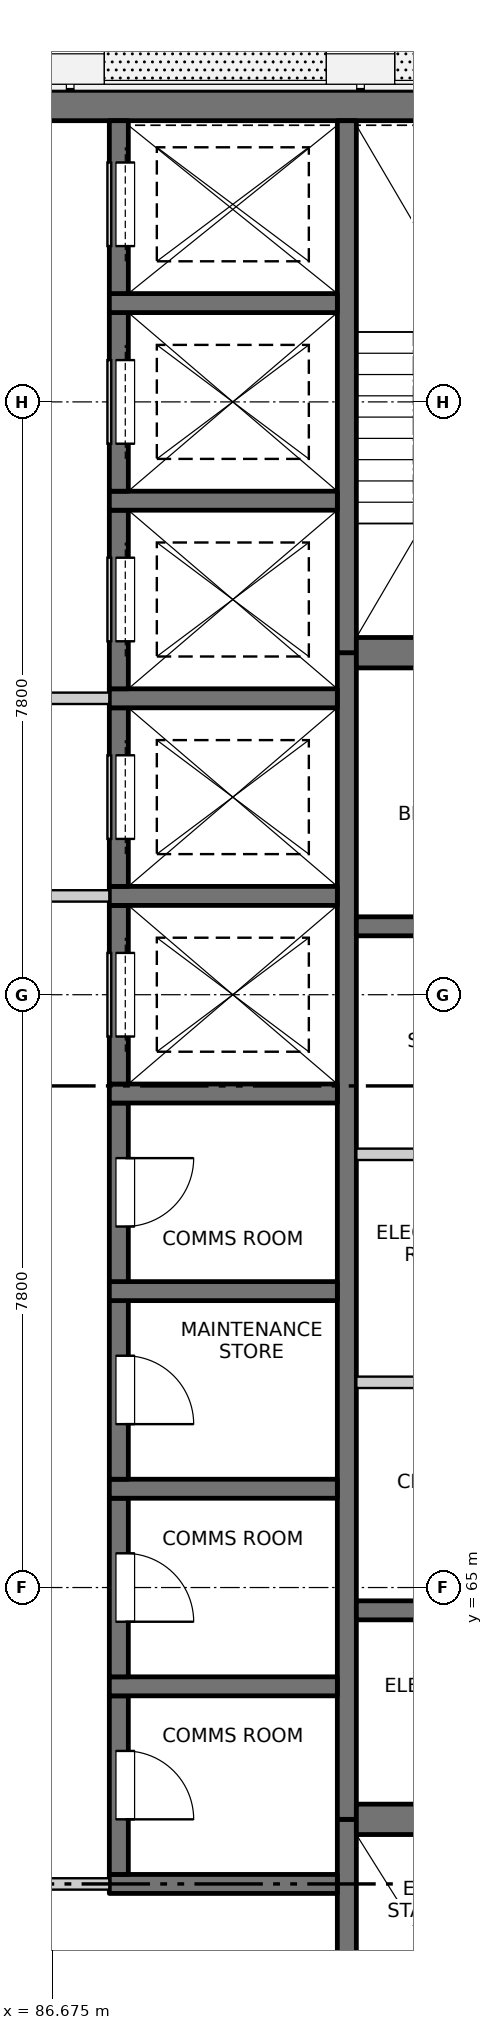
"""IFC4 building model, lengths in metres.
Left out: names, types, materials, properties, quantities, classifications, styles, units other than length and angle.
Written with IfcOpenShell. Run it as: python <this file> out.ifc"""

import sys

from ifc_helpers import new_model, si_unit, direction, frame, frame_2d, origin, place, context, subcontext, project, spatial, rectangle, extrude, element, fill, save


model = new_model("IFC4")
c1 = context("Model", 3, precision=1e-05, world=origin(), true_north=direction((0.0, 1.0)))
c2 = subcontext(c1, "Body", "Model", "MODEL_VIEW")
j1 = project(units=[si_unit("LENGTHUNIT", "METRE"), si_unit("PLANEANGLEUNIT", "RADIAN")], contexts=[c1])
p1 = place(None, origin())
s1 = spatial("IfcSite", under=j1, at=p1, CompositionType="ELEMENT")
p2 = place(p1, origin())
s2 = spatial("IfcBuilding", under=s1, at=p2, CompositionType="ELEMENT")
p3 = place(p2, frame((0.0, 0.0, 249.4)))
s3 = spatial("IfcBuildingStorey", under=s2, at=p3, CompositionType="ELEMENT", Elevation=249.4)
p4 = place(p3, frame((75.45, 84.5, -0.25), z_axis=(0.0, 0.0, 1.0), x_axis=(1.0, 0.0, 0.0)))
e1 = element("IfcWall", 1, at=p4, inside=s3, PredefinedType="SOLIDWALL", context=c2, shape_type="SweptSolid", body=[
    extrude(rectangle(XDim=19.1, YDim=0.4, at=frame_2d((9.55, 0.0))), origin(), (0.0, 0.0, 1.0), 3.4),
])
p5 = place(p3, frame((90.55, 55.45, -0.25), z_axis=(0.0, 0.0, 1.0), x_axis=(0.0, 1.0, 0.0)))
e2 = element("IfcWall", 2, at=p5, inside=s3, PredefinedType="SOLIDWALL", context=c2, shape_type="SweptSolid", body=[
    extrude(rectangle(XDim=6.5, YDim=0.25, at=frame_2d((3.25, 0.0))), origin(), (0.0, 0.0, 1.0), 3.4),
])
p6 = place(p3, frame((90.55, 61.95, -0.25), z_axis=(0.0, 0.0, 1.0), x_axis=(0.0, 1.0, 0.0)))
e3 = element("IfcWall", 3, at=p6, inside=s3, PredefinedType="SOLIDWALL", context=c2, shape_type="SweptSolid", body=[
    extrude(rectangle(XDim=15.35, YDim=0.25, at=frame_2d((7.675, 0.0))), origin(), (0.0, 0.0, 1.0), 3.4),
])
p7 = place(p3, frame((90.55, 77.3, -0.25), z_axis=(0.0, 0.0, 1.0), x_axis=(0.0, 1.0, 0.0)))
e4 = element("IfcWall", 4, at=p7, inside=s3, PredefinedType="SOLIDWALL", context=c2, shape_type="SweptSolid", body=[
    extrude(rectangle(XDim=7.0, YDim=0.25, at=frame_2d((3.5, 0.0))), origin(), (0.0, 0.0, 1.0), 3.4),
])
p8 = place(p3, frame((87.425, 61.1, -0.25), z_axis=(0.0, 0.0, 1.0), x_axis=(1.0, 0.0, 0.0)))
e5 = element("IfcWall", 5, at=p8, inside=s3, PredefinedType="SOLIDWALL", context=c2, shape_type="SweptSolid", body=[
    extrude(rectangle(XDim=3.0, YDim=0.25, at=frame_2d((1.5, 0.0))), origin(), (0.0, 0.0, 1.0), 3.4),
])
p9 = place(p3, frame((87.55, 61.225, -0.25), z_axis=(0.0, 0.0, 1.0), x_axis=(0.0, 1.0, 0.0)))
e6 = element("IfcWall", 6, at=p9, inside=s3, PredefinedType="SOLIDWALL", context=c2, shape_type="SweptSolid", body=[
    extrude(rectangle(XDim=2.35, YDim=0.25, at=frame_2d((1.175, 0.0))), origin(), (0.0, 0.0, 1.0), 3.4),
])
p10 = place(p9, frame((0.725, 0.0, 0.25)))
e7 = element("IfcOpeningElement", 7, at=p10, cuts=e6, PredefinedType="OPENING", context=c2, shape_type="SweptSolid", body=[
    extrude(rectangle(XDim=0.9, YDim=2.1, at=frame_2d((0.45, 1.05))), frame((0.0, 0.135, 0.0), z_axis=(0.0, -1.0, 0.0), x_axis=(1.0, 0.0, 0.0)), (0.0, 0.0, 1.0), 0.27),
])
p11 = place(p3, frame((87.425, 63.7, -0.25), z_axis=(0.0, 0.0, 1.0), x_axis=(1.0, 0.0, 0.0)))
e8 = element("IfcWall", 8, at=p11, inside=s3, PredefinedType="SOLIDWALL", context=c2, shape_type="SweptSolid", body=[
    extrude(rectangle(XDim=3.0, YDim=0.25, at=frame_2d((1.5, 0.0))), origin(), (0.0, 0.0, 1.0), 3.4),
])
p12 = place(p3, frame((87.55, 63.825, -0.25), z_axis=(0.0, 0.0, 1.0), x_axis=(0.0, 1.0, 0.0)))
e9 = element("IfcWall", 9, at=p12, inside=s3, PredefinedType="SOLIDWALL", context=c2, shape_type="SweptSolid", body=[
    extrude(rectangle(XDim=2.35, YDim=0.25, at=frame_2d((1.175, 0.0))), origin(), (0.0, 0.0, 1.0), 3.4),
])
p13 = place(p12, frame((0.725, 0.0, 0.25)))
e10 = element("IfcOpeningElement", 10, at=p13, cuts=e9, PredefinedType="OPENING", context=c2, shape_type="SweptSolid", body=[
    extrude(rectangle(XDim=0.9, YDim=2.1, at=frame_2d((0.45, 1.05))), frame((0.0, 0.135, 0.0), z_axis=(0.0, -1.0, 0.0), x_axis=(1.0, 0.0, 0.0)), (0.0, 0.0, 1.0), 0.27),
])
p14 = place(p3, frame((87.425, 66.3, -0.25), z_axis=(0.0, 0.0, 1.0), x_axis=(1.0, 0.0, 0.0)))
e11 = element("IfcWall", 11, at=p14, inside=s3, PredefinedType="SOLIDWALL", context=c2, shape_type="SweptSolid", body=[
    extrude(rectangle(XDim=3.0, YDim=0.25, at=frame_2d((1.5, 0.0))), origin(), (0.0, 0.0, 1.0), 3.4),
])
p15 = place(p3, frame((87.55, 66.425, -0.25), z_axis=(0.0, 0.0, 1.0), x_axis=(0.0, 1.0, 0.0)))
e12 = element("IfcWall", 12, at=p15, inside=s3, PredefinedType="SOLIDWALL", context=c2, shape_type="SweptSolid", body=[
    extrude(rectangle(XDim=2.35, YDim=0.25, at=frame_2d((1.175, 0.0))), origin(), (0.0, 0.0, 1.0), 3.4),
])
p16 = place(p15, frame((0.725, 0.0, 0.25)))
e13 = element("IfcOpeningElement", 13, at=p16, cuts=e12, PredefinedType="OPENING", context=c2, shape_type="SweptSolid", body=[
    extrude(rectangle(XDim=0.9, YDim=2.1, at=frame_2d((0.45, 1.05))), frame((0.0, 0.135, 0.0), z_axis=(0.0, -1.0, 0.0), x_axis=(1.0, 0.0, 0.0)), (0.0, 0.0, 1.0), 0.27),
])
p17 = place(p3, frame((87.425, 68.9, -0.25), z_axis=(0.0, 0.0, 1.0), x_axis=(1.0, 0.0, 0.0)))
e14 = element("IfcWall", 14, at=p17, inside=s3, PredefinedType="SOLIDWALL", context=c2, shape_type="SweptSolid", body=[
    extrude(rectangle(XDim=3.0, YDim=0.25, at=frame_2d((1.5, 0.0))), origin(), (0.0, 0.0, 1.0), 3.4),
])
p18 = place(p3, frame((87.55, 69.025, -0.25), z_axis=(0.0, 0.0, 1.0), x_axis=(0.0, 1.0, 0.0)))
e15 = element("IfcWall", 15, at=p18, inside=s3, PredefinedType="SOLIDWALL", context=c2, shape_type="SweptSolid", body=[
    extrude(rectangle(XDim=2.35, YDim=0.25, at=frame_2d((1.175, 0.0))), origin(), (0.0, 0.0, 1.0), 3.4),
])
p19 = place(p18, frame((0.725, 0.0, 0.25)))
e16 = element("IfcOpeningElement", 16, at=p19, cuts=e15, PredefinedType="OPENING", context=c2, shape_type="SweptSolid", body=[
    extrude(rectangle(XDim=0.9, YDim=2.1, at=frame_2d((0.45, 1.05))), frame((0.0, 0.135, 0.0), z_axis=(0.0, -1.0, 0.0), x_axis=(1.0, 0.0, 0.0)), (0.0, 0.0, 1.0), 0.27),
])
p20 = place(p3, frame((87.425, 71.5, -0.25), z_axis=(0.0, 0.0, 1.0), x_axis=(1.0, 0.0, 0.0)))
e17 = element("IfcWall", 17, at=p20, inside=s3, PredefinedType="SOLIDWALL", context=c2, shape_type="SweptSolid", body=[
    extrude(rectangle(XDim=3.0, YDim=0.25, at=frame_2d((1.5, 0.0))), origin(), (0.0, 0.0, 1.0), 3.4),
])
p21 = place(p3, frame((87.55, 71.625, -0.25), z_axis=(0.0, 0.0, 1.0), x_axis=(0.0, 1.0, 0.0)))
e18 = element("IfcWall", 18, at=p21, inside=s3, PredefinedType="SOLIDWALL", context=c2, shape_type="SweptSolid", body=[
    extrude(rectangle(XDim=2.35, YDim=0.25, at=frame_2d((1.175, 0.0))), origin(), (0.0, 0.0, 1.0), 3.4),
])
p22 = place(p21, frame((0.625, 0.0, 0.25)))
e19 = element("IfcOpeningElement", 19, at=p22, cuts=e18, PredefinedType="OPENING", context=c2, shape_type="SweptSolid", body=[
    extrude(rectangle(XDim=1.1, YDim=2.1, at=frame_2d((0.55, 1.05))), frame((0.0, 0.135, 0.0), z_axis=(0.0, -1.0, 0.0), x_axis=(1.0, 0.0, 0.0)), (0.0, 0.0, 1.0), 0.27),
])
p23 = place(p3, frame((87.425, 74.1, -0.25), z_axis=(0.0, 0.0, 1.0), x_axis=(1.0, 0.0, 0.0)))
e20 = element("IfcWall", 20, at=p23, inside=s3, PredefinedType="SOLIDWALL", context=c2, shape_type="SweptSolid", body=[
    extrude(rectangle(XDim=3.0, YDim=0.25, at=frame_2d((1.5, 0.0))), origin(), (0.0, 0.0, 1.0), 3.4),
])
p24 = place(p3, frame((87.55, 74.225, -0.25), z_axis=(0.0, 0.0, 1.0), x_axis=(0.0, 1.0, 0.0)))
e21 = element("IfcWall", 21, at=p24, inside=s3, PredefinedType="SOLIDWALL", context=c2, shape_type="SweptSolid", body=[
    extrude(rectangle(XDim=2.35, YDim=0.25, at=frame_2d((1.175, 0.0))), origin(), (0.0, 0.0, 1.0), 3.4),
])
p25 = place(p24, frame((0.625, 0.0, 0.25)))
e22 = element("IfcOpeningElement", 22, at=p25, cuts=e21, PredefinedType="OPENING", context=c2, shape_type="SweptSolid", body=[
    extrude(rectangle(XDim=1.1, YDim=2.1, at=frame_2d((0.55, 1.05))), frame((0.0, 0.135, 0.0), z_axis=(0.0, -1.0, 0.0), x_axis=(1.0, 0.0, 0.0)), (0.0, 0.0, 1.0), 0.27),
])
p26 = place(p3, frame((87.425, 76.7, -0.25), z_axis=(0.0, 0.0, 1.0), x_axis=(1.0, 0.0, 0.0)))
e23 = element("IfcWall", 23, at=p26, inside=s3, PredefinedType="SOLIDWALL", context=c2, shape_type="SweptSolid", body=[
    extrude(rectangle(XDim=3.0, YDim=0.25, at=frame_2d((1.5, 0.0))), origin(), (0.0, 0.0, 1.0), 3.4),
])
p27 = place(p3, frame((87.55, 76.825, -0.25), z_axis=(0.0, 0.0, 1.0), x_axis=(0.0, 1.0, 0.0)))
e24 = element("IfcWall", 24, at=p27, inside=s3, PredefinedType="SOLIDWALL", context=c2, shape_type="SweptSolid", body=[
    extrude(rectangle(XDim=2.35, YDim=0.25, at=frame_2d((1.175, 0.0))), origin(), (0.0, 0.0, 1.0), 3.4),
])
p28 = place(p27, frame((0.625, 0.0, 0.25)))
e25 = element("IfcOpeningElement", 25, at=p28, cuts=e24, PredefinedType="OPENING", context=c2, shape_type="SweptSolid", body=[
    extrude(rectangle(XDim=1.1, YDim=2.1, at=frame_2d((0.55, 1.05))), frame((0.0, 0.135, 0.0), z_axis=(0.0, -1.0, 0.0), x_axis=(1.0, 0.0, 0.0)), (0.0, 0.0, 1.0), 0.27),
])
p29 = place(p3, frame((87.425, 79.3, -0.25), z_axis=(0.0, 0.0, 1.0), x_axis=(1.0, 0.0, 0.0)))
e26 = element("IfcWall", 26, at=p29, inside=s3, PredefinedType="SOLIDWALL", context=c2, shape_type="SweptSolid", body=[
    extrude(rectangle(XDim=3.0, YDim=0.25, at=frame_2d((1.5, 0.0))), origin(), (0.0, 0.0, 1.0), 3.4),
])
p30 = place(p3, frame((87.55, 79.425, -0.25), z_axis=(0.0, 0.0, 1.0), x_axis=(0.0, 1.0, 0.0)))
e27 = element("IfcWall", 27, at=p30, inside=s3, PredefinedType="SOLIDWALL", context=c2, shape_type="SweptSolid", body=[
    extrude(rectangle(XDim=2.35, YDim=0.25, at=frame_2d((1.175, 0.0))), origin(), (0.0, 0.0, 1.0), 3.4),
])
p31 = place(p30, frame((0.625, 0.0, 0.25)))
e28 = element("IfcOpeningElement", 28, at=p31, cuts=e27, PredefinedType="OPENING", context=c2, shape_type="SweptSolid", body=[
    extrude(rectangle(XDim=1.1, YDim=2.1, at=frame_2d((0.55, 1.05))), frame((0.0, 0.135, 0.0), z_axis=(0.0, -1.0, 0.0), x_axis=(1.0, 0.0, 0.0)), (0.0, 0.0, 1.0), 0.27),
])
p32 = place(p3, frame((87.425, 81.9, -0.25), z_axis=(0.0, 0.0, 1.0), x_axis=(1.0, 0.0, 0.0)))
e29 = element("IfcWall", 29, at=p32, inside=s3, PredefinedType="SOLIDWALL", context=c2, shape_type="SweptSolid", body=[
    extrude(rectangle(XDim=3.0, YDim=0.25, at=frame_2d((1.5, 0.0))), origin(), (0.0, 0.0, 1.0), 3.4),
])
p33 = place(p3, frame((87.55, 82.025, -0.25), z_axis=(0.0, 0.0, 1.0), x_axis=(0.0, 1.0, 0.0)))
e30 = element("IfcWall", 30, at=p33, inside=s3, PredefinedType="SOLIDWALL", context=c2, shape_type="SweptSolid", body=[
    extrude(rectangle(XDim=2.275, YDim=0.25, at=frame_2d((1.138, 0.0))), origin(), (0.0, 0.0, 1.0), 3.4),
])
p34 = place(p33, frame((0.625, 0.0, 0.25)))
e31 = element("IfcOpeningElement", 31, at=p34, cuts=e30, PredefinedType="OPENING", context=c2, shape_type="SweptSolid", body=[
    extrude(rectangle(XDim=1.1, YDim=2.1, at=frame_2d((0.55, 1.05))), frame((0.0, 0.135, 0.0), z_axis=(0.0, -1.0, 0.0), x_axis=(1.0, 0.0, 0.0)), (0.0, 0.0, 1.0), 0.27),
])
p35 = place(p3, frame((90.675, 61.95, -0.25), z_axis=(0.0, 0.0, 1.0), x_axis=(1.0, 0.0, 0.0)))
e32 = element("IfcWall", 32, at=p35, inside=s3, PredefinedType="SOLIDWALL", context=c2, shape_type="SweptSolid", body=[
    extrude(rectangle(XDim=3.875, YDim=0.4, at=frame_2d((1.938, 0.0))), origin(), (0.0, 0.0, 1.0), 3.4),
])
for number, where, z_axis, x_axis in (
    (33, (90.675, 64.7, -0.25), (0.0, 0.0, 1.0), (1.0, 0.0, 0.0)),
    (34, (90.675, 73.7, -0.25), (0.0, 0.0, 1.0), (1.0, 0.0, 0.0)),
):
    element("IfcWall", number, at=place(p3, frame(where, z_axis=z_axis, x_axis=x_axis)), inside=s3, PredefinedType="SOLIDWALL", context=c2, shape_type="SweptSolid", body=[
        extrude(rectangle(XDim=3.875, YDim=0.25, at=frame_2d((1.938, 0.0))), origin(), (0.0, 0.0, 1.0), 3.4),
    ])
p36 = place(p3, frame((90.675, 77.3, -0.25), z_axis=(0.0, 0.0, 1.0), x_axis=(1.0, 0.0, 0.0)))
e35 = element("IfcWall", 35, at=p36, inside=s3, PredefinedType="SOLIDWALL", context=c2, shape_type="SweptSolid", body=[
    extrude(rectangle(XDim=3.875, YDim=0.4, at=frame_2d((1.938, 0.0))), origin(), (0.0, 0.0, 1.0), 3.4),
])
p37 = place(p3, frame((82.575, 61.1, 0.0), z_axis=(0.0, 0.0, 1.0), x_axis=(1.0, 0.0, 0.0)))
e36 = element("IfcWall", 36, at=p37, inside=s3, PredefinedType="PARTITIONING", context=c2, shape_type="SweptSolid", body=[
    extrude(rectangle(XDim=4.85, YDim=0.15, at=frame_2d((2.425, 0.0))), origin(), (0.0, 0.0, 1.0), 3.15),
])
p38 = place(p37, frame((1.525, 0.0, 0.0)))
e37 = element("IfcOpeningElement", 37, at=p38, cuts=e36, PredefinedType="OPENING", context=c2, shape_type="SweptSolid", body=[
    extrude(rectangle(XDim=1.8, YDim=2.1, at=frame_2d((0.9, 1.05))), frame((0.0, 0.085, 0.0), z_axis=(0.0, -1.0, 0.0), x_axis=(1.0, 0.0, 0.0)), (0.0, 0.0, 1.0), 0.17),
])
for number, where, z_axis, x_axis in (
    (38, (90.675, 67.7, 0.0), (0.0, 0.0, 1.0), (1.0, 0.0, 0.0)),
    (39, (90.675, 70.7, 0.0), (0.0, 0.0, 1.0), (1.0, 0.0, 0.0)),
):
    element("IfcWall", number, at=place(p3, frame(where, z_axis=z_axis, x_axis=x_axis)), inside=s3, PredefinedType="PARTITIONING", context=c2, shape_type="SweptSolid", body=[
        extrude(rectangle(XDim=3.875, YDim=0.15, at=frame_2d((1.938, 0.0))), origin(), (0.0, 0.0, 1.0), 3.15),
    ])
p39 = place(p3, frame((82.575, 74.1, 0.0), z_axis=(0.0, 0.0, 1.0), x_axis=(1.0, 0.0, 0.0)))
e40 = element("IfcWall", 40, at=p39, inside=s3, PredefinedType="PARTITIONING", context=c2, shape_type="SweptSolid", body=[
    extrude(rectangle(XDim=4.85, YDim=0.15, at=frame_2d((2.425, 0.0))), origin(), (0.0, 0.0, 1.0), 3.15),
])
p40 = place(p39, frame((1.525, 0.0, 0.0)))
e41 = element("IfcOpeningElement", 41, at=p40, cuts=e40, PredefinedType="OPENING", context=c2, shape_type="SweptSolid", body=[
    extrude(rectangle(XDim=1.8, YDim=2.1, at=frame_2d((0.9, 1.05))), frame((0.0, 0.085, 0.0), z_axis=(0.0, -1.0, 0.0), x_axis=(1.0, 0.0, 0.0)), (0.0, 0.0, 1.0), 0.17),
])
p41 = place(p3, frame((82.575, 76.7, 0.0), z_axis=(0.0, 0.0, 1.0), x_axis=(1.0, 0.0, 0.0)))
e42 = element("IfcWall", 42, at=p41, inside=s3, PredefinedType="PARTITIONING", context=c2, shape_type="SweptSolid", body=[
    extrude(rectangle(XDim=4.85, YDim=0.15, at=frame_2d((2.425, 0.0))), origin(), (0.0, 0.0, 1.0), 3.15),
])
p42 = place(p41, frame((1.525, 0.0, 0.0)))
e43 = element("IfcOpeningElement", 43, at=p42, cuts=e42, PredefinedType="OPENING", context=c2, shape_type="SweptSolid", body=[
    extrude(rectangle(XDim=1.8, YDim=2.1, at=frame_2d((0.9, 1.05))), frame((0.0, 0.085, 0.0), z_axis=(0.0, -1.0, 0.0), x_axis=(1.0, 0.0, 0.0)), (0.0, 0.0, 1.0), 0.17),
])
p43 = place(p10, origin())
e44 = element("IfcDoor", 44, at=p43, inside=s3, OperationType="SINGLE_SWING_RIGHT", PredefinedType="DOOR", context=c2, shape_type="SweptSolid", body=[
    extrude(rectangle(XDim=0.9, YDim=2.1, at=frame_2d((0.45, 1.05))), frame((0.0, -0.06, 0.0), z_axis=(0.0, -1.0, 0.0), x_axis=(1.0, 0.0, 0.0)), (0.0, 0.0, 1.0), 0.05),
])
fill(e7, e44)
p44 = place(p13, origin())
e45 = element("IfcDoor", 45, at=p44, inside=s3, OperationType="SINGLE_SWING_RIGHT", PredefinedType="DOOR", context=c2, shape_type="SweptSolid", body=[
    extrude(rectangle(XDim=0.9, YDim=2.1, at=frame_2d((0.45, 1.05))), frame((0.0, -0.06, 0.0), z_axis=(0.0, -1.0, 0.0), x_axis=(1.0, 0.0, 0.0)), (0.0, 0.0, 1.0), 0.05),
])
fill(e10, e45)
p45 = place(p16, origin())
e46 = element("IfcDoor", 46, at=p45, inside=s3, OperationType="SINGLE_SWING_RIGHT", PredefinedType="DOOR", context=c2, shape_type="SweptSolid", body=[
    extrude(rectangle(XDim=0.9, YDim=2.1, at=frame_2d((0.45, 1.05))), frame((0.0, -0.06, 0.0), z_axis=(0.0, -1.0, 0.0), x_axis=(1.0, 0.0, 0.0)), (0.0, 0.0, 1.0), 0.05),
])
fill(e13, e46)
p46 = place(p19, origin())
e47 = element("IfcDoor", 47, at=p46, inside=s3, OperationType="SINGLE_SWING_LEFT", PredefinedType="DOOR", context=c2, shape_type="SweptSolid", body=[
    extrude(rectangle(XDim=0.9, YDim=2.1, at=frame_2d((0.45, 1.05))), frame((0.0, -0.06, 0.0), z_axis=(0.0, -1.0, 0.0), x_axis=(1.0, 0.0, 0.0)), (0.0, 0.0, 1.0), 0.05),
])
fill(e16, e47)
p47 = place(p22, origin())
e48 = element("IfcDoor", 48, at=p47, inside=s3, OperationType="SLIDING_TO_LEFT", PredefinedType="DOOR", context=c2, shape_type="SweptSolid", body=[
    extrude(rectangle(XDim=1.1, YDim=2.1, at=frame_2d((0.55, 1.05))), frame((0.0, -0.06, 0.0), z_axis=(0.0, -1.0, 0.0), x_axis=(1.0, 0.0, 0.0)), (0.0, 0.0, 1.0), 0.05),
])
fill(e19, e48)
p48 = place(p25, origin())
e49 = element("IfcDoor", 49, at=p48, inside=s3, OperationType="SLIDING_TO_LEFT", PredefinedType="DOOR", context=c2, shape_type="SweptSolid", body=[
    extrude(rectangle(XDim=1.1, YDim=2.1, at=frame_2d((0.55, 1.05))), frame((0.0, -0.06, 0.0), z_axis=(0.0, -1.0, 0.0), x_axis=(1.0, 0.0, 0.0)), (0.0, 0.0, 1.0), 0.05),
])
fill(e22, e49)
p49 = place(p28, origin())
e50 = element("IfcDoor", 50, at=p49, inside=s3, OperationType="SLIDING_TO_LEFT", PredefinedType="DOOR", context=c2, shape_type="SweptSolid", body=[
    extrude(rectangle(XDim=1.1, YDim=2.1, at=frame_2d((0.55, 1.05))), frame((0.0, -0.06, 0.0), z_axis=(0.0, -1.0, 0.0), x_axis=(1.0, 0.0, 0.0)), (0.0, 0.0, 1.0), 0.05),
])
fill(e25, e50)
p50 = place(p31, origin())
e51 = element("IfcDoor", 51, at=p50, inside=s3, OperationType="SLIDING_TO_RIGHT", PredefinedType="DOOR", context=c2, shape_type="SweptSolid", body=[
    extrude(rectangle(XDim=1.1, YDim=2.1, at=frame_2d((0.55, 1.05))), frame((0.0, -0.06, 0.0), z_axis=(0.0, -1.0, 0.0), x_axis=(1.0, 0.0, 0.0)), (0.0, 0.0, 1.0), 0.05),
])
fill(e28, e51)
p51 = place(p34, origin())
e52 = element("IfcDoor", 52, at=p51, inside=s3, OperationType="SLIDING_TO_RIGHT", PredefinedType="DOOR", context=c2, shape_type="SweptSolid", body=[
    extrude(rectangle(XDim=1.1, YDim=2.1, at=frame_2d((0.55, 1.05))), frame((0.0, -0.06, 0.0), z_axis=(0.0, -1.0, 0.0), x_axis=(1.0, 0.0, 0.0)), (0.0, 0.0, 1.0), 0.05),
])
fill(e31, e52)
save(model, sys.argv[1])
